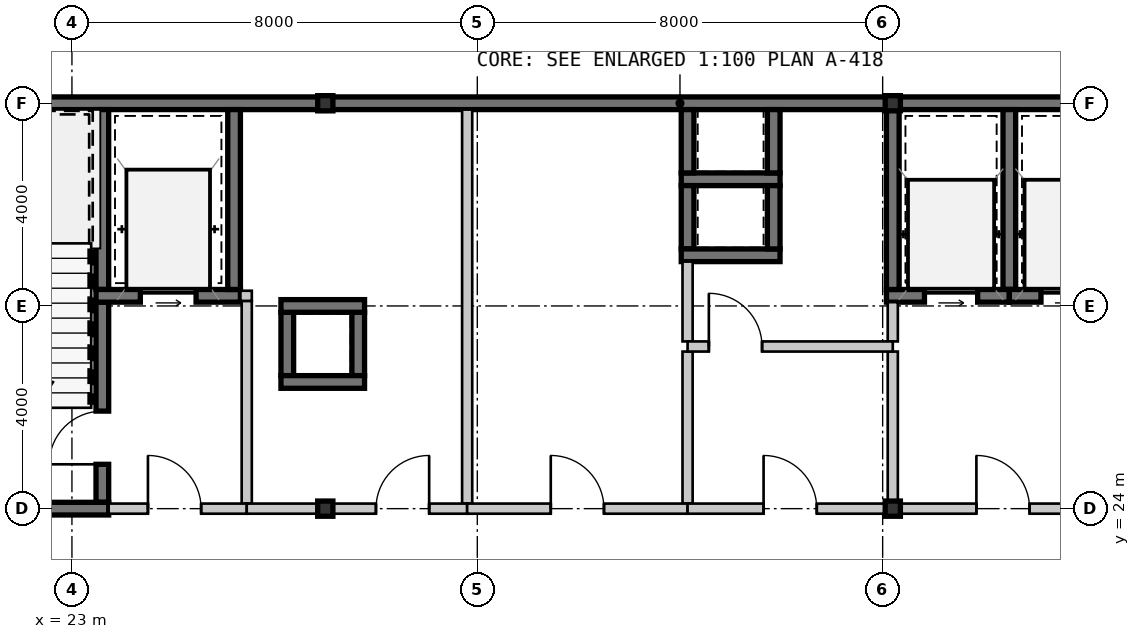
"""IFC4 building model, lengths in metres.
Left out: names, types, materials, properties, quantities, classifications, styles, units other than length and angle.
Written with IfcOpenShell. Run it as: python <this file> out.ifc"""

import sys

from ifc_helpers import new_model, si_unit, direction, frame, frame_2d, origin, origin_2d, place, context, subcontext, project, spatial, rectangle, hollow_rectangle, extrude, source, transform, mapped, element, fill, save


model = new_model("IFC4")
c1 = context("Model", 3, precision=1e-05, world=origin(), true_north=direction((0.0, 1.0)))
c2 = subcontext(c1, "Body", "Model", "MODEL_VIEW")
j1 = project(units=[si_unit("LENGTHUNIT", "METRE"), si_unit("PLANEANGLEUNIT", "RADIAN")], contexts=[c1])
p1 = place(None, origin())
s1 = spatial("IfcSite", under=j1, at=p1, CompositionType="ELEMENT")
p2 = place(p1, origin())
s2 = spatial("IfcBuilding", under=s1, at=p2, CompositionType="ELEMENT")
p3 = place(p2, frame((0.0, 0.0, 239.75)))
s3 = spatial("IfcBuildingStorey", under=s2, at=p3, CompositionType="ELEMENT", Elevation=239.75)
m1 = source(origin(), c2, "Body", "SweptSolid", [
    extrude(hollow_rectangle(XDim=0.3, YDim=0.3, WallThickness=0.012, at=origin_2d()), origin(), (0.0, 0.0, 1.0), 3.15),
])
for number, where, z_axis, x_axis in (
    (1, (28.0, 24.0, 0.0), (0.0, 0.0, 1.0), (1.0, 0.0, 0.0)),
    (2, (39.2, 24.0, 0.0), (0.0, 0.0, 1.0), (1.0, 0.0, 0.0)),
    (3, (28.0, 32.0, 0.0), (0.0, 0.0, 1.0), (1.0, 0.0, 0.0)),
    (4, (39.2, 32.0, 0.0), (0.0, 0.0, 1.0), (1.0, 0.0, 0.0)),
):
    element("IfcColumn", number, at=place(p3, frame(where, z_axis=z_axis, x_axis=x_axis)), inside=s3, PredefinedType="COLUMN", context=c2, shape_type="MappedRepresentation", body=[
        mapped(m1, transform((0.0, 0.0, 0.0), scale=1.0)),
    ])
m2 = source(origin(), c2, "Body", "SweptSolid", [
    extrude(rectangle(XDim=9.125, YDim=0.25, at=frame_2d((4.562, 0.0))), origin(), (0.0, 0.0, 1.0), 2.93),
])
p4 = place(p3, frame((18.875, 32.0, 0.0), z_axis=(0.0, 0.0, 1.0), x_axis=(1.0, 0.0, 0.0)))
e5 = element("IfcWall", 5, at=p4, inside=s3, PredefinedType="SHEAR", context=c2, shape_type="MappedRepresentation", body=[
    mapped(m2, transform((0.0, 0.0, 0.0), scale=1.0)),
])
m3 = source(origin(), c2, "Body", "SweptSolid", [
    extrude(rectangle(XDim=11.2, YDim=0.25, at=frame_2d((5.6, 0.0))), origin(), (0.0, 0.0, 1.0), 2.93),
])
p5 = place(p3, frame((28.0, 32.0, 0.0), z_axis=(0.0, 0.0, 1.0), x_axis=(1.0, 0.0, 0.0)))
e6 = element("IfcWall", 6, at=p5, inside=s3, PredefinedType="SHEAR", context=c2, shape_type="MappedRepresentation", body=[
    mapped(m3, transform((0.0, 0.0, 0.0), scale=1.0)),
])
m4 = source(origin(), c2, "Body", "SweptSolid", [
    extrude(rectangle(XDim=11.925, YDim=0.25, at=frame_2d((5.962, 0.0))), origin(), (0.0, 0.0, 1.0), 2.93),
])
p6 = place(p3, frame((39.2, 32.0, 0.0), z_axis=(0.0, 0.0, 1.0), x_axis=(1.0, 0.0, 0.0)))
e7 = element("IfcWall", 7, at=p6, inside=s3, PredefinedType="SHEAR", context=c2, shape_type="MappedRepresentation", body=[
    mapped(m4, transform((0.0, 0.0, 0.0), scale=1.0)),
])
m5 = source(origin(), c2, "Body", "SweptSolid", [
    extrude(rectangle(XDim=3.55, YDim=0.25, at=frame_2d((1.775, 0.0))), origin(), (0.0, 0.0, 1.0), 2.93),
])
p7 = place(p3, frame((23.6, 28.325, 0.0), z_axis=(0.0, 0.0, 1.0), x_axis=(0.0, 1.0, 0.0)))
e8 = element("IfcWall", 8, at=p7, inside=s3, PredefinedType="SHEAR", context=c2, shape_type="MappedRepresentation", body=[
    mapped(m5, transform((0.0, 0.0, 0.0), scale=1.0)),
])
m6 = source(origin(), c2, "Body", "SweptSolid", [
    extrude(rectangle(XDim=3.95, YDim=0.25, at=frame_2d((1.975, 0.0))), origin(), (0.0, 0.0, 1.0), 2.93),
])
p8 = place(p3, frame((23.6, 24.125, 0.0), z_axis=(0.0, 0.0, 1.0), x_axis=(0.0, 1.0, 0.0)))
e9 = element("IfcWall", 9, at=p8, inside=s3, PredefinedType="SHEAR", context=c2, shape_type="MappedRepresentation", body=[
    mapped(m6, transform((0.0, 0.0, 0.0), scale=1.0)),
])
m7 = source(origin(), c2, "Body", "SweptSolid", [
    extrude(rectangle(XDim=1.05, YDim=2.1, at=frame_2d((0.525, 1.05))), frame((0.0, 0.135, 0.0), z_axis=(0.0, -1.0, 0.0), x_axis=(1.0, 0.0, 0.0)), (0.0, 0.0, 1.0), 0.27),
])
p9 = place(p8, frame((0.75, 0.0, 0.0)))
e10 = element("IfcOpeningElement", 10, at=p9, cuts=e9, PredefinedType="OPENING", context=c2, shape_type="MappedRepresentation", body=[
    mapped(m7, transform((0.0, 0.0, 0.0), scale=1.0)),
])
m8 = source(origin(), c2, "Body", "SweptSolid", [
    extrude(rectangle(XDim=4.85, YDim=0.25, at=frame_2d((2.425, 0.0))), origin(), (0.0, 0.0, 1.0), 2.93),
])
p10 = place(p3, frame((18.875, 24.0, 0.0), z_axis=(0.0, 0.0, 1.0), x_axis=(1.0, 0.0, 0.0)))
e11 = element("IfcWall", 11, at=p10, inside=s3, PredefinedType="SHEAR", context=c2, shape_type="MappedRepresentation", body=[
    mapped(m8, transform((0.0, 0.0, 0.0), scale=1.0)),
])
m9 = source(origin(), c2, "Body", "SweptSolid", [
    extrude(rectangle(XDim=2.85, YDim=0.25, at=frame_2d((1.425, 0.0))), origin(), (0.0, 0.0, 1.0), 2.93),
])
p11 = place(p3, frame((23.475, 28.2, 0.0), z_axis=(0.0, 0.0, 1.0), x_axis=(1.0, 0.0, 0.0)))
e12 = element("IfcWall", 12, at=p11, inside=s3, PredefinedType="SHEAR", context=c2, shape_type="MappedRepresentation", body=[
    mapped(m9, transform((0.0, 0.0, 0.0), scale=1.0)),
])
m10 = source(origin(), c2, "Body", "SweptSolid", [
    extrude(rectangle(XDim=1.1, YDim=2.15, at=frame_2d((0.55, 1.075))), frame((0.0, 0.135, 0.0), z_axis=(0.0, -1.0, 0.0), x_axis=(1.0, 0.0, 0.0)), (0.0, 0.0, 1.0), 0.27),
])
p12 = place(p11, frame((0.875, 0.0, 0.0)))
e13 = element("IfcOpeningElement", 13, at=p12, cuts=e12, PredefinedType="OPENING", context=c2, shape_type="MappedRepresentation", body=[
    mapped(m10, transform((0.0, 0.0, 0.0), scale=1.0)),
])
p13 = place(p3, frame((26.2, 28.325, 0.0), z_axis=(0.0, 0.0, 1.0), x_axis=(0.0, 1.0, 0.0)))
e14 = element("IfcWall", 14, at=p13, inside=s3, PredefinedType="SHEAR", context=c2, shape_type="MappedRepresentation", body=[
    mapped(m5, transform((0.0, 0.0, 0.0), scale=1.0)),
])
m11 = source(origin(), c2, "Body", "SweptSolid", [
    extrude(rectangle(XDim=4.0, YDim=0.2, at=frame_2d((2.0, 0.0))), origin(), (0.0, 0.0, 1.0), 2.93),
])
p14 = place(p3, frame((26.45, 24.1, 0.0), z_axis=(0.0, 0.0, 1.0), x_axis=(0.0, 1.0, 0.0)))
e15 = element("IfcWall", 15, at=p14, inside=s3, PredefinedType="SOLIDWALL", context=c2, shape_type="MappedRepresentation", body=[
    mapped(m11, transform((0.0, 0.0, 0.0), scale=1.0)),
])
m12 = source(origin(), c2, "Body", "SweptSolid", [
    extrude(rectangle(XDim=2.725, YDim=0.2, at=frame_2d((1.362, 0.0))), origin(), (0.0, 0.0, 1.0), 2.47),
])
p15 = place(p3, frame((23.725, 24.0, 0.0), z_axis=(0.0, 0.0, 1.0), x_axis=(1.0, 0.0, 0.0)))
e16 = element("IfcWall", 16, at=p15, inside=s3, PredefinedType="SOLIDWALL", context=c2, shape_type="MappedRepresentation", body=[
    mapped(m12, transform((0.0, 0.0, 0.0), scale=1.0)),
])
m13 = source(origin(), c2, "Body", "SweptSolid", [
    extrude(rectangle(XDim=1.05, YDim=2.1, at=frame_2d((0.525, 1.05))), frame((0.0, 0.11, 0.0), z_axis=(0.0, -1.0, 0.0), x_axis=(1.0, 0.0, 0.0)), (0.0, 0.0, 1.0), 0.22),
])
p16 = place(p15, frame((0.775, 0.0, 0.0)))
e17 = element("IfcOpeningElement", 17, at=p16, cuts=e16, PredefinedType="OPENING", context=c2, shape_type="MappedRepresentation", body=[
    mapped(m13, transform((0.0, 0.0, 0.0), scale=1.0)),
])
m14 = source(origin(), c2, "Body", "SweptSolid", [
    extrude(rectangle(XDim=1.95, YDim=0.25, at=frame_2d((0.975, 0.0))), origin(), (0.0, 0.0, 1.0), 2.93),
])
p17 = place(p3, frame((35.025, 30.5, 0.0), z_axis=(0.0, 0.0, 1.0), x_axis=(1.0, 0.0, 0.0)))
e18 = element("IfcWall", 18, at=p17, inside=s3, PredefinedType="SHEAR", context=c2, shape_type="MappedRepresentation", body=[
    mapped(m14, transform((0.0, 0.0, 0.0), scale=1.0)),
])
m15 = source(origin(), c2, "Body", "SweptSolid", [
    extrude(rectangle(XDim=1.25, YDim=0.25, at=frame_2d((0.625, 0.0))), origin(), (0.0, 0.0, 1.0), 2.93),
])
for number, where, z_axis, x_axis in (
    (19, (35.15, 31.875, 0.0), (0.0, 0.0, 1.0), (0.0, -1.0, 0.0)),
    (20, (36.85, 30.625, 0.0), (0.0, 0.0, 1.0), (0.0, 1.0, 0.0)),
    (21, (35.15, 30.375, 0.0), (0.0, 0.0, 1.0), (0.0, -1.0, 0.0)),
):
    element("IfcWall", number, at=place(p3, frame(where, z_axis=z_axis, x_axis=x_axis)), inside=s3, PredefinedType="SHEAR", context=c2, shape_type="MappedRepresentation", body=[
        mapped(m15, transform((0.0, 0.0, 0.0), scale=1.0)),
    ])
p18 = place(p3, frame((35.025, 29.0, 0.0), z_axis=(0.0, 0.0, 1.0), x_axis=(1.0, 0.0, 0.0)))
e22 = element("IfcWall", 22, at=p18, inside=s3, PredefinedType="SHEAR", context=c2, shape_type="MappedRepresentation", body=[
    mapped(m14, transform((0.0, 0.0, 0.0), scale=1.0)),
])
for number, where, z_axis, x_axis in (
    (23, (36.85, 29.125, 0.0), (0.0, 0.0, 1.0), (0.0, 1.0, 0.0)),
    (24, (28.65, 26.625, 0.0), (0.0, 0.0, 1.0), (0.0, 1.0, 0.0)),
    (25, (27.25, 27.875, 0.0), (0.0, 0.0, 1.0), (0.0, -1.0, 0.0)),
):
    element("IfcWall", number, at=place(p3, frame(where, z_axis=z_axis, x_axis=x_axis)), inside=s3, PredefinedType="SHEAR", context=c2, shape_type="MappedRepresentation", body=[
        mapped(m15, transform((0.0, 0.0, 0.0), scale=1.0)),
    ])
m16 = source(origin(), c2, "Body", "SweptSolid", [
    extrude(rectangle(XDim=1.65, YDim=0.25, at=frame_2d((0.825, 0.0))), origin(), (0.0, 0.0, 1.0), 2.93),
])
for number, where, z_axis, x_axis in (
    (26, (28.775, 28.0, 0.0), (0.0, 0.0, 1.0), (-1.0, 0.0, 0.0)),
    (27, (27.125, 26.5, 0.0), (0.0, 0.0, 1.0), (1.0, 0.0, 0.0)),
):
    element("IfcWall", number, at=place(p3, frame(where, z_axis=z_axis, x_axis=x_axis)), inside=s3, PredefinedType="SHEAR", context=c2, shape_type="MappedRepresentation", body=[
        mapped(m16, transform((0.0, 0.0, 0.0), scale=1.0)),
    ])
p19 = place(p3, frame((41.5, 28.325, 0.0), z_axis=(0.0, 0.0, 1.0), x_axis=(0.0, 1.0, 0.0)))
e28 = element("IfcWall", 28, at=p19, inside=s3, PredefinedType="SHEAR", context=c2, shape_type="MappedRepresentation", body=[
    mapped(m5, transform((0.0, 0.0, 0.0), scale=1.0)),
])
m17 = source(origin(), c2, "Body", "SweptSolid", [
    extrude(rectangle(XDim=2.425, YDim=0.25, at=frame_2d((1.212, 0.0))), origin(), (0.0, 0.0, 1.0), 2.93),
])
p20 = place(p3, frame((39.075, 28.2, 0.0), z_axis=(0.0, 0.0, 1.0), x_axis=(1.0, 0.0, 0.0)))
e29 = element("IfcWall", 29, at=p20, inside=s3, PredefinedType="SHEAR", context=c2, shape_type="MappedRepresentation", body=[
    mapped(m17, transform((0.0, 0.0, 0.0), scale=1.0)),
])
m18 = source(origin(), c2, "Body", "SweptSolid", [
    extrude(rectangle(XDim=1.05, YDim=2.15, at=frame_2d((0.525, 1.075))), frame((0.0, 0.135, 0.0), z_axis=(0.0, -1.0, 0.0), x_axis=(1.0, 0.0, 0.0)), (0.0, 0.0, 1.0), 0.27),
])
p21 = place(p20, frame((0.75, 0.0, 0.0)))
e30 = element("IfcOpeningElement", 30, at=p21, cuts=e29, PredefinedType="OPENING", context=c2, shape_type="MappedRepresentation", body=[
    mapped(m18, transform((0.0, 0.0, 0.0), scale=1.0)),
])
p22 = place(p3, frame((39.2, 31.875, 0.0), z_axis=(0.0, 0.0, 1.0), x_axis=(0.0, -1.0, 0.0)))
e31 = element("IfcWall", 31, at=p22, inside=s3, PredefinedType="SHEAR", context=c2, shape_type="MappedRepresentation", body=[
    mapped(m5, transform((0.0, 0.0, 0.0), scale=1.0)),
])
m19 = source(origin(), c2, "Body", "SweptSolid", [
    extrude(rectangle(XDim=2.07, YDim=0.25, at=frame_2d((1.035, 0.0))), origin(), (0.0, 0.0, 1.0), 2.93),
])
p23 = place(p3, frame((41.5, 28.2, 0.0), z_axis=(0.0, 0.0, 1.0), x_axis=(1.0, 0.0, 0.0)))
e32 = element("IfcWall", 32, at=p23, inside=s3, PredefinedType="SHEAR", context=c2, shape_type="MappedRepresentation", body=[
    mapped(m19, transform((0.0, 0.0, 0.0), scale=1.0)),
])
p24 = place(p23, frame((0.625, 0.0, 0.0)))
e33 = element("IfcOpeningElement", 33, at=p24, cuts=e32, PredefinedType="OPENING", context=c2, shape_type="MappedRepresentation", body=[
    mapped(m18, transform((0.0, 0.0, 0.0), scale=1.0)),
])
m20 = source(origin(), c2, "Body", "SweptSolid", [
    extrude(rectangle(XDim=3.0, YDim=0.2, at=frame_2d((1.5, 0.0))), origin(), (0.0, 0.0, 1.0), 2.47),
])
p25 = place(p3, frame((39.2, 24.1, 0.0), z_axis=(0.0, 0.0, 1.0), x_axis=(0.0, 1.0, 0.0)))
e34 = element("IfcWall", 34, at=p25, inside=s3, PredefinedType="SOLIDWALL", context=c2, shape_type="MappedRepresentation", body=[
    mapped(m20, transform((0.0, 0.0, 0.0), scale=1.0)),
])
m21 = source(origin(), c2, "Body", "SweptSolid", [
    extrude(rectangle(XDim=0.775, YDim=0.2, at=frame_2d((0.387, 0.0))), origin(), (0.0, 0.0, 1.0), 2.47),
])
p26 = place(p3, frame((39.2, 27.3, 0.0), z_axis=(0.0, 0.0, 1.0), x_axis=(0.0, 1.0, 0.0)))
e35 = element("IfcWall", 35, at=p26, inside=s3, PredefinedType="SOLIDWALL", context=c2, shape_type="MappedRepresentation", body=[
    mapped(m21, transform((0.0, 0.0, 0.0), scale=1.0)),
])
m22 = source(origin(), c2, "Body", "SweptSolid", [
    extrude(rectangle(XDim=4.35, YDim=0.2, at=frame_2d((2.175, 0.0))), origin(), (0.0, 0.0, 1.0), 2.397),
])
p27 = place(p3, frame((43.55, 24.0, 0.0), z_axis=(0.0, 0.0, 1.0), x_axis=(-1.0, 0.0, 0.0)))
e36 = element("IfcWall", 36, at=p27, inside=s3, PredefinedType="SOLIDWALL", context=c2, shape_type="MappedRepresentation", body=[
    mapped(m22, transform((0.0, 0.0, 0.0), scale=1.0)),
])
p28 = place(p27, frame((1.65, 0.0, 0.0)))
e37 = element("IfcOpeningElement", 37, at=p28, cuts=e36, PredefinedType="OPENING", context=c2, shape_type="MappedRepresentation", body=[
    mapped(m13, transform((0.0, 0.0, 0.0), scale=1.0)),
])
m23 = source(origin(), c2, "Body", "SweptSolid", [
    extrude(rectangle(XDim=7.775, YDim=0.2, at=frame_2d((3.887, 0.0))), origin(), (0.0, 0.0, 1.0), 2.93),
])
p29 = place(p3, frame((30.8, 31.875, 0.0), z_axis=(0.0, 0.0, 1.0), x_axis=(0.0, -1.0, 0.0)))
e38 = element("IfcWall", 38, at=p29, inside=s3, PredefinedType="SOLIDWALL", context=c2, shape_type="MappedRepresentation", body=[
    mapped(m23, transform((0.0, 0.0, 0.0), scale=1.0)),
])
m24 = source(origin(), c2, "Body", "SweptSolid", [
    extrude(rectangle(XDim=4.35, YDim=0.2, at=frame_2d((2.175, 0.0))), origin(), (0.0, 0.0, 1.0), 2.47),
])
p30 = place(p3, frame((30.8, 24.0, 0.0), z_axis=(0.0, 0.0, 1.0), x_axis=(-1.0, 0.0, 0.0)))
e39 = element("IfcWall", 39, at=p30, inside=s3, PredefinedType="SOLIDWALL", context=c2, shape_type="MappedRepresentation", body=[
    mapped(m24, transform((0.0, 0.0, 0.0), scale=1.0)),
])
p31 = place(p30, frame((0.75, 0.0, 0.0)))
e40 = element("IfcOpeningElement", 40, at=p31, cuts=e39, PredefinedType="OPENING", context=c2, shape_type="MappedRepresentation", body=[
    mapped(m13, transform((0.0, 0.0, 0.0), scale=1.0)),
])
m25 = source(origin(), c2, "Body", "SweptSolid", [
    extrude(rectangle(XDim=3.0, YDim=0.2, at=frame_2d((1.5, 0.0))), origin(), (0.0, 0.0, 1.0), 2.93),
])
p32 = place(p3, frame((35.15, 27.1, 0.0), z_axis=(0.0, 0.0, 1.0), x_axis=(0.0, -1.0, 0.0)))
e41 = element("IfcWall", 41, at=p32, inside=s3, PredefinedType="SOLIDWALL", context=c2, shape_type="MappedRepresentation", body=[
    mapped(m25, transform((0.0, 0.0, 0.0), scale=1.0)),
])
m26 = source(origin(), c2, "Body", "SweptSolid", [
    extrude(rectangle(XDim=1.575, YDim=0.2, at=frame_2d((0.788, 0.0))), origin(), (0.0, 0.0, 1.0), 2.93),
])
p33 = place(p3, frame((35.15, 28.875, 0.0), z_axis=(0.0, 0.0, 1.0), x_axis=(0.0, -1.0, 0.0)))
e42 = element("IfcWall", 42, at=p33, inside=s3, PredefinedType="SOLIDWALL", context=c2, shape_type="MappedRepresentation", body=[
    mapped(m26, transform((0.0, 0.0, 0.0), scale=1.0)),
])
m27 = source(origin(), c2, "Body", "SweptSolid", [
    extrude(rectangle(XDim=4.35, YDim=0.2, at=frame_2d((2.175, 0.0))), origin(), (0.0, 0.0, 1.0), 2.47),
])
p34 = place(p3, frame((35.15, 24.0, 0.0), z_axis=(0.0, 0.0, 1.0), x_axis=(-1.0, 0.0, 0.0)))
e43 = element("IfcWall", 43, at=p34, inside=s3, PredefinedType="SOLIDWALL", context=c2, shape_type="MappedRepresentation", body=[
    mapped(m27, transform((0.0, 0.0, 0.0), scale=1.0)),
])
p35 = place(p34, frame((1.65, 0.0, 0.0)))
e44 = element("IfcOpeningElement", 44, at=p35, cuts=e43, PredefinedType="OPENING", context=c2, shape_type="MappedRepresentation", body=[
    mapped(m13, transform((0.0, 0.0, 0.0), scale=1.0)),
])
m28 = source(origin(), c2, "Body", "SweptSolid", [
    extrude(rectangle(XDim=4.05, YDim=0.2, at=frame_2d((2.025, 0.0))), origin(), (0.0, 0.0, 1.0), 2.93),
])
p36 = place(p3, frame((35.15, 27.2, 0.0), z_axis=(0.0, 0.0, 1.0), x_axis=(1.0, 0.0, 0.0)))
e45 = element("IfcWall", 45, at=p36, inside=s3, PredefinedType="SOLIDWALL", context=c2, shape_type="MappedRepresentation", body=[
    mapped(m28, transform((0.0, 0.0, 0.0), scale=1.0)),
])
p37 = place(p36, frame((0.42, 0.0, 0.0)))
e46 = element("IfcOpeningElement", 46, at=p37, cuts=e45, PredefinedType="OPENING", context=c2, shape_type="MappedRepresentation", body=[
    mapped(m13, transform((0.0, 0.0, 0.0), scale=1.0)),
])
m29 = source(origin(), c2, "Body", "SweptSolid", [
    extrude(rectangle(XDim=4.05, YDim=0.2, at=frame_2d((2.025, 0.0))), origin(), (0.0, 0.0, 1.0), 2.47),
])
p38 = place(p3, frame((39.2, 24.0, 0.0), z_axis=(0.0, 0.0, 1.0), x_axis=(-1.0, 0.0, 0.0)))
e47 = element("IfcWall", 47, at=p38, inside=s3, PredefinedType="SOLIDWALL", context=c2, shape_type="MappedRepresentation", body=[
    mapped(m29, transform((0.0, 0.0, 0.0), scale=1.0)),
])
p39 = place(p38, frame((1.5, 0.0, 0.0)))
e48 = element("IfcOpeningElement", 48, at=p39, cuts=e47, PredefinedType="OPENING", context=c2, shape_type="MappedRepresentation", body=[
    mapped(m13, transform((0.0, 0.0, 0.0), scale=1.0)),
])
m30 = source(origin(), c2, "Body", "SweptSolid", [
    extrude(rectangle(XDim=0.225, YDim=0.2, at=frame_2d((0.113, 0.0))), origin(), (0.0, 0.0, 1.0), 2.93),
])
p40 = place(p3, frame((26.325, 28.2, 0.0), z_axis=(0.0, 0.0, 1.0), x_axis=(1.0, 0.0, 0.0)))
e49 = element("IfcWall", 49, at=p40, inside=s3, PredefinedType="SOLIDWALL", context=c2, shape_type="MappedRepresentation", body=[
    mapped(m30, transform((0.0, 0.0, 0.0), scale=1.0)),
])
m31 = source(origin(), c2, "Body", "SweptSolid", [
    extrude(rectangle(XDim=1.05, YDim=2.1, at=frame_2d((0.525, 1.05))), frame((0.0, 0.025, 0.0), z_axis=(0.0, -1.0, 0.0), x_axis=(1.0, 0.0, 0.0)), (0.0, 0.0, 1.0), 0.05),
])
p41 = place(p9, origin())
e50 = element("IfcDoor", 50, at=p41, inside=s3, OperationType="SINGLE_SWING_LEFT", PredefinedType="DOOR", context=c2, shape_type="MappedRepresentation", body=[
    mapped(m31, transform((0.0, 0.0, 0.0), scale=1.0)),
])
fill(e10, e50)
m32 = source(origin(), c2, "Body", "SweptSolid", [
    extrude(rectangle(XDim=1.1, YDim=2.15, at=frame_2d((0.55, 1.075))), frame((0.0, 0.025, 0.0), z_axis=(0.0, -1.0, 0.0), x_axis=(1.0, 0.0, 0.0)), (0.0, 0.0, 1.0), 0.05),
])
p42 = place(p12, origin())
e51 = element("IfcDoor", 51, at=p42, inside=s3, OperationType="SLIDING_TO_LEFT", PredefinedType="DOOR", context=c2, shape_type="MappedRepresentation", body=[
    mapped(m32, transform((0.0, 0.0, 0.0), scale=1.0)),
])
fill(e13, e51)
p43 = place(p16, origin())
e52 = element("IfcDoor", 52, at=p43, inside=s3, OperationType="SINGLE_SWING_LEFT", PredefinedType="DOOR", context=c2, shape_type="MappedRepresentation", body=[
    mapped(m31, transform((0.0, 0.0, 0.0), scale=1.0)),
])
fill(e17, e52)
m33 = source(origin(), c2, "Body", "SweptSolid", [
    extrude(rectangle(XDim=1.05, YDim=2.15, at=frame_2d((0.525, 1.075))), frame((0.0, 0.025, 0.0), z_axis=(0.0, -1.0, 0.0), x_axis=(1.0, 0.0, 0.0)), (0.0, 0.0, 1.0), 0.05),
])
p44 = place(p21, origin())
e53 = element("IfcDoor", 53, at=p44, inside=s3, OperationType="SLIDING_TO_LEFT", PredefinedType="DOOR", context=c2, shape_type="MappedRepresentation", body=[
    mapped(m33, transform((0.0, 0.0, 0.0), scale=1.0)),
])
fill(e30, e53)
p45 = place(p24, origin())
e54 = element("IfcDoor", 54, at=p45, inside=s3, OperationType="SLIDING_TO_LEFT", PredefinedType="DOOR", context=c2, shape_type="MappedRepresentation", body=[
    mapped(m33, transform((0.0, 0.0, 0.0), scale=1.0)),
])
fill(e33, e54)
p46 = place(p28, frame((1.05, 0.0, 0.0), z_axis=(0.0, 0.0, 1.0), x_axis=(-1.0, 0.0, 0.0)))
e55 = element("IfcDoor", 55, at=p46, inside=s3, OperationType="SINGLE_SWING_LEFT", PredefinedType="DOOR", context=c2, shape_type="MappedRepresentation", body=[
    mapped(m31, transform((0.0, 0.0, 0.0), scale=1.0)),
])
fill(e37, e55)
p47 = place(p31, frame((1.05, 0.0, 0.0), z_axis=(0.0, 0.0, 1.0), x_axis=(-1.0, 0.0, 0.0)))
e56 = element("IfcDoor", 56, at=p47, inside=s3, OperationType="SINGLE_SWING_RIGHT", PredefinedType="DOOR", context=c2, shape_type="MappedRepresentation", body=[
    mapped(m31, transform((0.0, 0.0, 0.0), scale=1.0)),
])
fill(e40, e56)
p48 = place(p35, frame((1.05, 0.0, 0.0), z_axis=(0.0, 0.0, 1.0), x_axis=(-1.0, 0.0, 0.0)))
e57 = element("IfcDoor", 57, at=p48, inside=s3, OperationType="SINGLE_SWING_LEFT", PredefinedType="DOOR", context=c2, shape_type="MappedRepresentation", body=[
    mapped(m31, transform((0.0, 0.0, 0.0), scale=1.0)),
])
fill(e44, e57)
p49 = place(p37, origin())
e58 = element("IfcDoor", 58, at=p49, inside=s3, OperationType="SINGLE_SWING_LEFT", PredefinedType="DOOR", context=c2, shape_type="MappedRepresentation", body=[
    mapped(m31, transform((0.0, 0.0, 0.0), scale=1.0)),
])
fill(e46, e58)
p50 = place(p39, frame((1.05, 0.0, 0.0), z_axis=(0.0, 0.0, 1.0), x_axis=(-1.0, 0.0, 0.0)))
e59 = element("IfcDoor", 59, at=p50, inside=s3, OperationType="SINGLE_SWING_LEFT", PredefinedType="DOOR", context=c2, shape_type="MappedRepresentation", body=[
    mapped(m31, transform((0.0, 0.0, 0.0), scale=1.0)),
])
fill(e48, e59)
save(model, sys.argv[1])
